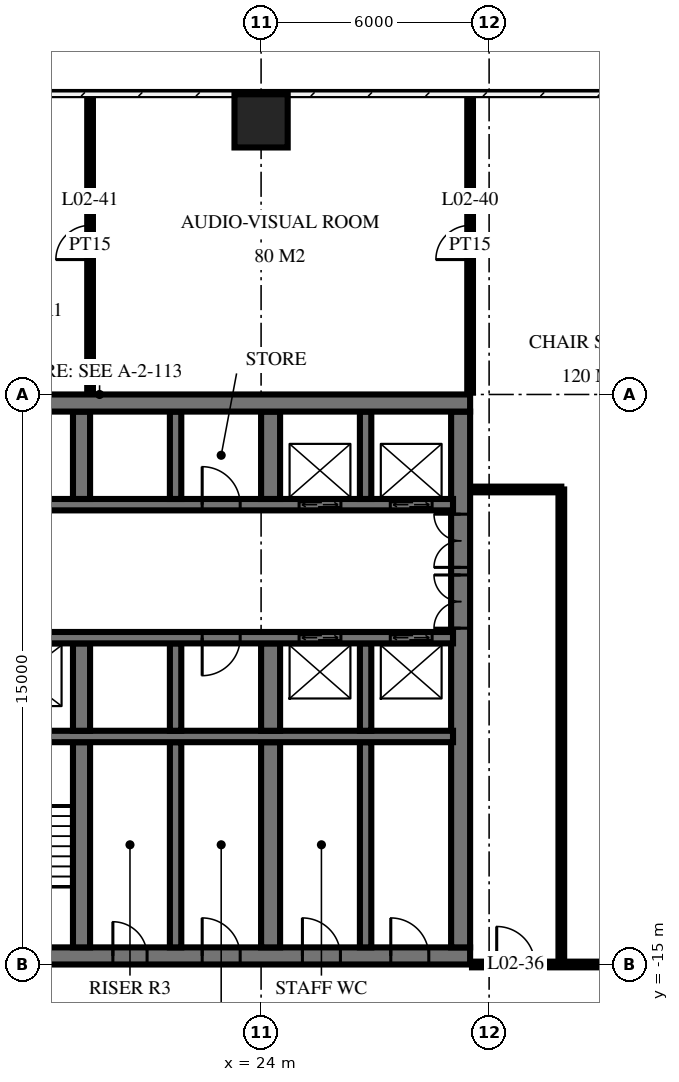
"""IFC4 building model, lengths in metres.
Left out: names, types, materials, properties, quantities, classifications, styles, units other than length and angle.
Written with IfcOpenShell. Run it as: python <this file> out.ifc"""

import sys

from ifc_helpers import new_model, si_unit, direction, frame, frame_2d, origin, origin_2d, place, context, subcontext, project, spatial, rectangle, circle, extrude, element, fill, save


model = new_model("IFC4")
c1 = context("Model", 3, precision=1e-05, world=origin(), true_north=direction((0.0, 1.0)))
c2 = subcontext(c1, "Body", "Model", "MODEL_VIEW")
j1 = project(units=[si_unit("LENGTHUNIT", "METRE"), si_unit("PLANEANGLEUNIT", "RADIAN")], contexts=[c1])
p1 = place(None, origin())
s1 = spatial("IfcSite", under=j1, at=p1, CompositionType="ELEMENT")
p2 = place(p1, origin())
s2 = spatial("IfcBuilding", under=s1, at=p2, CompositionType="ELEMENT")
p3 = place(p2, frame((0.0, 0.0, 12.5)))
s3 = spatial("IfcBuildingStorey", under=s2, at=p3, CompositionType="ELEMENT", Elevation=12.5)
p4 = place(p3, frame((24.0, 7.2, 0.0), z_axis=(0.0, 0.0, 1.0), x_axis=(1.0, 0.0, 0.0)))
e1 = element("IfcColumn", 1, at=p4, inside=s3, PredefinedType="COLUMN", context=c2, shape_type="SweptSolid", body=[
    extrude(circle(Radius=0.7, at=origin_2d()), origin(), (0.0, 0.0, 1.0), 5.5),
])
p5 = place(p3, frame((10.0, -0.225, 0.0), z_axis=(0.0, 0.0, 1.0), x_axis=(1.0, 0.0, 0.0)))
e2 = element("IfcWall", 2, at=p5, inside=s3, PredefinedType="SHEAR", context=c2, shape_type="SweptSolid", body=[
    extrude(rectangle(XDim=19.5, YDim=0.45, at=frame_2d((9.75, 0.0))), origin(), (0.0, 0.0, 1.0), 5.5),
])
p6 = place(p3, frame((10.0, -14.775, 0.0), z_axis=(0.0, 0.0, 1.0), x_axis=(1.0, 0.0, 0.0)))
e3 = element("IfcWall", 3, at=p6, inside=s3, PredefinedType="SHEAR", context=c2, shape_type="SweptSolid", body=[
    extrude(rectangle(XDim=19.5, YDim=0.45, at=frame_2d((9.75, 0.0))), origin(), (0.0, 0.0, 1.0), 5.5),
])
p7 = place(p6, frame((7.1, 0.0, 0.0)))
e4 = element("IfcOpeningElement", 4, at=p7, cuts=e3, PredefinedType="OPENING", context=c2, shape_type="SweptSolid", body=[
    extrude(rectangle(XDim=1.2, YDim=2.1, at=frame_2d((0.6, 1.05))), frame((0.0, 0.235, 0.0), z_axis=(0.0, -1.0, 0.0), x_axis=(1.0, 0.0, 0.0)), (0.0, 0.0, 1.0), 0.47),
])
p8 = place(p6, frame((4.15, 0.0, 0.0)))
e5 = element("IfcOpeningElement", 5, at=p8, cuts=e3, PredefinedType="OPENING", context=c2, shape_type="SweptSolid", body=[
    extrude(rectangle(XDim=1.1, YDim=2.1, at=frame_2d((0.55, 1.05))), frame((0.0, 0.235, 0.0), z_axis=(0.0, -1.0, 0.0), x_axis=(1.0, 0.0, 0.0)), (0.0, 0.0, 1.0), 0.47),
])
p9 = place(p6, frame((10.1, 0.0, 0.0)))
e6 = element("IfcOpeningElement", 6, at=p9, cuts=e3, PredefinedType="OPENING", context=c2, shape_type="SweptSolid", body=[
    extrude(rectangle(XDim=0.9, YDim=2.1, at=frame_2d((0.45, 1.05))), frame((0.0, 0.235, 0.0), z_axis=(0.0, -1.0, 0.0), x_axis=(1.0, 0.0, 0.0)), (0.0, 0.0, 1.0), 0.47),
])
p10 = place(p6, frame((12.45, 0.0, 0.0)))
e7 = element("IfcOpeningElement", 7, at=p10, cuts=e3, PredefinedType="OPENING", context=c2, shape_type="SweptSolid", body=[
    extrude(rectangle(XDim=1.0, YDim=2.1, at=frame_2d((0.5, 1.05))), frame((0.0, 0.235, 0.0), z_axis=(0.0, -1.0, 0.0), x_axis=(1.0, 0.0, 0.0)), (0.0, 0.0, 1.0), 0.47),
])
p11 = place(p6, frame((15.087, 0.0, 0.0)))
e8 = element("IfcOpeningElement", 8, at=p11, cuts=e3, PredefinedType="OPENING", context=c2, shape_type="SweptSolid", body=[
    extrude(rectangle(XDim=1.0, YDim=2.1, at=frame_2d((0.5, 1.05))), frame((0.0, 0.235, 0.0), z_axis=(0.0, -1.0, 0.0), x_axis=(1.0, 0.0, 0.0)), (0.0, 0.0, 1.0), 0.47),
])
p12 = place(p6, frame((17.413, 0.0, 0.0)))
e9 = element("IfcOpeningElement", 9, at=p12, cuts=e3, PredefinedType="OPENING", context=c2, shape_type="SweptSolid", body=[
    extrude(rectangle(XDim=1.0, YDim=2.1, at=frame_2d((0.5, 1.05))), frame((0.0, 0.235, 0.0), z_axis=(0.0, -1.0, 0.0), x_axis=(1.0, 0.0, 0.0)), (0.0, 0.0, 1.0), 0.47),
])
p13 = place(p3, frame((29.25, -14.55, 0.0), z_axis=(0.0, 0.0, 1.0), x_axis=(0.0, 1.0, 0.0)))
e10 = element("IfcWall", 10, at=p13, inside=s3, PredefinedType="SHEAR", context=c2, shape_type="SweptSolid", body=[
    extrude(rectangle(XDim=14.1, YDim=0.5, at=frame_2d((7.05, 0.0))), origin(), (0.0, 0.0, 1.0), 5.5),
])
p14 = place(p13, frame((8.4, 0.0, 0.0)))
e11 = element("IfcOpeningElement", 11, at=p14, cuts=e10, PredefinedType="OPENING", context=c2, shape_type="SweptSolid", body=[
    extrude(rectangle(XDim=1.4, YDim=2.4, at=frame_2d((0.7, 1.2))), frame((0.0, 0.26, 0.0), z_axis=(0.0, -1.0, 0.0), x_axis=(1.0, 0.0, 0.0)), (0.0, 0.0, 1.0), 0.52),
])
p15 = place(p13, frame((10.0, 0.0, 0.0)))
e12 = element("IfcOpeningElement", 12, at=p15, cuts=e10, PredefinedType="OPENING", context=c2, shape_type="SweptSolid", body=[
    extrude(rectangle(XDim=1.4, YDim=2.4, at=frame_2d((0.7, 1.2))), frame((0.0, 0.26, 0.0), z_axis=(0.0, -1.0, 0.0), x_axis=(1.0, 0.0, 0.0)), (0.0, 0.0, 1.0), 0.52),
])
p16 = place(p3, frame((10.35, -2.9, 0.0), z_axis=(0.0, 0.0, 1.0), x_axis=(1.0, 0.0, 0.0)))
e13 = element("IfcWall", 13, at=p16, inside=s3, PredefinedType="SHEAR", context=c2, shape_type="SweptSolid", body=[
    extrude(rectangle(XDim=18.7, YDim=0.3, at=frame_2d((9.35, 0.0))), origin(), (0.0, 0.0, 1.0), 5.5),
])
p17 = place(p16, frame((14.65, 0.0, 0.0)))
e14 = element("IfcOpeningElement", 14, at=p17, cuts=e13, PredefinedType="OPENING", context=c2, shape_type="SweptSolid", body=[
    extrude(rectangle(XDim=1.1, YDim=2.1, at=frame_2d((0.55, 1.05))), frame((0.0, 0.16, 0.0), z_axis=(0.0, -1.0, 0.0), x_axis=(1.0, 0.0, 0.0)), (0.0, 0.0, 1.0), 0.32),
])
p18 = place(p16, frame((17.05, 0.0, 0.0)))
e15 = element("IfcOpeningElement", 15, at=p18, cuts=e13, PredefinedType="OPENING", context=c2, shape_type="SweptSolid", body=[
    extrude(rectangle(XDim=1.1, YDim=2.1, at=frame_2d((0.55, 1.05))), frame((0.0, 0.16, 0.0), z_axis=(0.0, -1.0, 0.0), x_axis=(1.0, 0.0, 0.0)), (0.0, 0.0, 1.0), 0.32),
])
p19 = place(p16, frame((6.9, 0.0, 0.0)))
e16 = element("IfcOpeningElement", 16, at=p19, cuts=e13, PredefinedType="OPENING", context=c2, shape_type="SweptSolid", body=[
    extrude(rectangle(XDim=0.9, YDim=2.1, at=frame_2d((0.45, 1.05))), frame((0.0, 0.16, 0.0), z_axis=(0.0, -1.0, 0.0), x_axis=(1.0, 0.0, 0.0)), (0.0, 0.0, 1.0), 0.32),
])
p20 = place(p16, frame((0.85, 0.0, 0.0)))
e17 = element("IfcOpeningElement", 17, at=p20, cuts=e13, PredefinedType="OPENING", context=c2, shape_type="SweptSolid", body=[
    extrude(rectangle(XDim=1.0, YDim=2.1, at=frame_2d((0.5, 1.05))), frame((0.0, 0.16, 0.0), z_axis=(0.0, -1.0, 0.0), x_axis=(1.0, 0.0, 0.0)), (0.0, 0.0, 1.0), 0.32),
])
p21 = place(p16, frame((3.85, 0.0, 0.0)))
e18 = element("IfcOpeningElement", 18, at=p21, cuts=e13, PredefinedType="OPENING", context=c2, shape_type="SweptSolid", body=[
    extrude(rectangle(XDim=1.0, YDim=2.1, at=frame_2d((0.5, 1.05))), frame((0.0, 0.16, 0.0), z_axis=(0.0, -1.0, 0.0), x_axis=(1.0, 0.0, 0.0)), (0.0, 0.0, 1.0), 0.32),
])
p22 = place(p16, frame((12.1, 0.0, 0.0)))
e19 = element("IfcOpeningElement", 19, at=p22, cuts=e13, PredefinedType="OPENING", context=c2, shape_type="SweptSolid", body=[
    extrude(rectangle(XDim=1.0, YDim=2.1, at=frame_2d((0.5, 1.05))), frame((0.0, 0.16, 0.0), z_axis=(0.0, -1.0, 0.0), x_axis=(1.0, 0.0, 0.0)), (0.0, 0.0, 1.0), 0.32),
])
p23 = place(p3, frame((10.35, -6.4, 0.0), z_axis=(0.0, 0.0, 1.0), x_axis=(1.0, 0.0, 0.0)))
e20 = element("IfcWall", 20, at=p23, inside=s3, PredefinedType="SHEAR", context=c2, shape_type="SweptSolid", body=[
    extrude(rectangle(XDim=18.7, YDim=0.3, at=frame_2d((9.35, 0.0))), origin(), (0.0, 0.0, 1.0), 5.5),
])
p24 = place(p23, frame((14.65, 0.0, 0.0)))
e21 = element("IfcOpeningElement", 21, at=p24, cuts=e20, PredefinedType="OPENING", context=c2, shape_type="SweptSolid", body=[
    extrude(rectangle(XDim=1.1, YDim=2.1, at=frame_2d((0.55, 1.05))), frame((0.0, 0.16, 0.0), z_axis=(0.0, -1.0, 0.0), x_axis=(1.0, 0.0, 0.0)), (0.0, 0.0, 1.0), 0.32),
])
p25 = place(p23, frame((17.05, 0.0, 0.0)))
e22 = element("IfcOpeningElement", 22, at=p25, cuts=e20, PredefinedType="OPENING", context=c2, shape_type="SweptSolid", body=[
    extrude(rectangle(XDim=1.1, YDim=2.1, at=frame_2d((0.55, 1.05))), frame((0.0, 0.16, 0.0), z_axis=(0.0, -1.0, 0.0), x_axis=(1.0, 0.0, 0.0)), (0.0, 0.0, 1.0), 0.32),
])
p26 = place(p23, frame((6.8, 0.0, 0.0)))
e23 = element("IfcOpeningElement", 23, at=p26, cuts=e20, PredefinedType="OPENING", context=c2, shape_type="SweptSolid", body=[
    extrude(rectangle(XDim=1.1, YDim=2.1, at=frame_2d((0.55, 1.05))), frame((0.0, 0.16, 0.0), z_axis=(0.0, -1.0, 0.0), x_axis=(1.0, 0.0, 0.0)), (0.0, 0.0, 1.0), 0.32),
])
p27 = place(p23, frame((12.1, 0.0, 0.0)))
e24 = element("IfcOpeningElement", 24, at=p27, cuts=e20, PredefinedType="OPENING", context=c2, shape_type="SweptSolid", body=[
    extrude(rectangle(XDim=1.0, YDim=2.1, at=frame_2d((0.5, 1.05))), frame((0.0, 0.16, 0.0), z_axis=(0.0, -1.0, 0.0), x_axis=(1.0, 0.0, 0.0)), (0.0, 0.0, 1.0), 0.32),
])
p28 = place(p3, frame((10.35, -9.0, 0.0), z_axis=(0.0, 0.0, 1.0), x_axis=(1.0, 0.0, 0.0)))
e25 = element("IfcWall", 25, at=p28, inside=s3, PredefinedType="SHEAR", context=c2, shape_type="SweptSolid", body=[
    extrude(rectangle(XDim=18.7, YDim=0.3, at=frame_2d((9.35, 0.0))), origin(), (0.0, 0.0, 1.0), 5.5),
])
p29 = place(p28, frame((3.8, 0.0, 0.0)))
e26 = element("IfcOpeningElement", 26, at=p29, cuts=e25, PredefinedType="OPENING", context=c2, shape_type="SweptSolid", body=[
    extrude(rectangle(XDim=1.1, YDim=2.1, at=frame_2d((0.55, 1.05))), frame((0.0, 0.16, 0.0), z_axis=(0.0, -1.0, 0.0), x_axis=(1.0, 0.0, 0.0)), (0.0, 0.0, 1.0), 0.32),
])
for number, where, z_axis, x_axis in (
    (27, (19.275, -2.75, 0.0), (0.0, 0.0, 1.0), (0.0, 1.0, 0.0)),
    (28, (19.275, -8.85, 0.0), (0.0, 0.0, 1.0), (0.0, 1.0, 0.0)),
):
    element("IfcWall", number, at=place(p3, frame(where, z_axis=z_axis, x_axis=x_axis)), inside=s3, PredefinedType="SHEAR", context=c2, shape_type="SweptSolid", body=[
        extrude(rectangle(XDim=2.3, YDim=0.45, at=frame_2d((1.15, 0.0))), origin(), (0.0, 0.0, 1.0), 5.5),
    ])
p30 = place(p3, frame((19.275, -14.55, 0.0), z_axis=(0.0, 0.0, 1.0), x_axis=(0.0, 1.0, 0.0)))
e29 = element("IfcWall", 29, at=p30, inside=s3, PredefinedType="SHEAR", context=c2, shape_type="SweptSolid", body=[
    extrude(rectangle(XDim=5.4, YDim=0.45, at=frame_2d((2.7, 0.0))), origin(), (0.0, 0.0, 1.0), 5.5),
])
for number, where, z_axis, x_axis in (
    (30, (21.75, -2.75, 0.0), (0.0, 0.0, 1.0), (0.0, 1.0, 0.0)),
    (31, (21.75, -8.85, 0.0), (0.0, 0.0, 1.0), (0.0, 1.0, 0.0)),
):
    element("IfcWall", number, at=place(p3, frame(where, z_axis=z_axis, x_axis=x_axis)), inside=s3, PredefinedType="SHEAR", context=c2, shape_type="SweptSolid", body=[
        extrude(rectangle(XDim=2.3, YDim=0.3, at=frame_2d((1.15, 0.0))), origin(), (0.0, 0.0, 1.0), 5.5),
    ])
p31 = place(p3, frame((21.75, -14.55, 0.0), z_axis=(0.0, 0.0, 1.0), x_axis=(0.0, 1.0, 0.0)))
e32 = element("IfcWall", 32, at=p31, inside=s3, PredefinedType="SHEAR", context=c2, shape_type="SweptSolid", body=[
    extrude(rectangle(XDim=5.4, YDim=0.3, at=frame_2d((2.7, 0.0))), origin(), (0.0, 0.0, 1.0), 5.5),
])
for number, where, z_axis, x_axis in (
    (33, (24.25, -2.75, 0.0), (0.0, 0.0, 1.0), (0.0, 1.0, 0.0)),
    (34, (24.25, -8.85, 0.0), (0.0, 0.0, 1.0), (0.0, 1.0, 0.0)),
):
    element("IfcWall", number, at=place(p3, frame(where, z_axis=z_axis, x_axis=x_axis)), inside=s3, PredefinedType="SHEAR", context=c2, shape_type="SweptSolid", body=[
        extrude(rectangle(XDim=2.3, YDim=0.5, at=frame_2d((1.15, 0.0))), origin(), (0.0, 0.0, 1.0), 5.5),
    ])
p32 = place(p3, frame((24.25, -14.55, 0.0), z_axis=(0.0, 0.0, 1.0), x_axis=(0.0, 1.0, 0.0)))
e35 = element("IfcWall", 35, at=p32, inside=s3, PredefinedType="SHEAR", context=c2, shape_type="SweptSolid", body=[
    extrude(rectangle(XDim=5.4, YDim=0.5, at=frame_2d((2.7, 0.0))), origin(), (0.0, 0.0, 1.0), 5.5),
])
for number, where, z_axis, x_axis in (
    (36, (26.75, -2.75, 0.0), (0.0, 0.0, 1.0), (0.0, 1.0, 0.0)),
    (37, (26.75, -8.85, 0.0), (0.0, 0.0, 1.0), (0.0, 1.0, 0.0)),
):
    element("IfcWall", number, at=place(p3, frame(where, z_axis=z_axis, x_axis=x_axis)), inside=s3, PredefinedType="SHEAR", context=c2, shape_type="SweptSolid", body=[
        extrude(rectangle(XDim=2.3, YDim=0.3, at=frame_2d((1.15, 0.0))), origin(), (0.0, 0.0, 1.0), 5.5),
    ])
p33 = place(p3, frame((26.75, -14.55, 0.0), z_axis=(0.0, 0.0, 1.0), x_axis=(0.0, 1.0, 0.0)))
e38 = element("IfcWall", 38, at=p33, inside=s3, PredefinedType="SHEAR", context=c2, shape_type="SweptSolid", body=[
    extrude(rectangle(XDim=5.4, YDim=0.3, at=frame_2d((2.7, 0.0))), origin(), (0.0, 0.0, 1.0), 5.5),
])
p34 = place(p3, frame((31.9, -15.0, 0.0), z_axis=(0.0, 0.0, 1.0), x_axis=(0.0, 1.0, 0.0)))
e39 = element("IfcWall", 39, at=p34, inside=s3, PredefinedType="PARTITIONING", context=c2, shape_type="SweptSolid", body=[
    extrude(rectangle(XDim=12.5, YDim=0.15, at=frame_2d((6.25, 0.0))), origin(), (0.0, 0.0, 1.0), 5.05),
])
p35 = place(p3, frame((29.5, 0.05, 0.0), z_axis=(0.0, 0.0, 1.0), x_axis=(0.0, 1.0, 0.0)))
e40 = element("IfcWall", 40, at=p35, inside=s3, PredefinedType="PARTITIONING", context=c2, shape_type="SweptSolid", body=[
    extrude(rectangle(XDim=7.77, YDim=0.15, at=frame_2d((3.885, 0.0))), origin(), (0.0, 0.0, 1.0), 5.05),
])
p36 = place(p35, frame((3.5, 0.0, 0.0)))
e41 = element("IfcOpeningElement", 41, at=p36, cuts=e40, PredefinedType="OPENING", context=c2, shape_type="SweptSolid", body=[
    extrude(rectangle(XDim=0.9, YDim=2.1, at=frame_2d((0.45, 1.05))), frame((0.0, 0.085, 0.0), z_axis=(0.0, -1.0, 0.0), x_axis=(1.0, 0.0, 0.0)), (0.0, 0.0, 1.0), 0.17),
])
p37 = place(p3, frame((19.5, 0.05, 0.0), z_axis=(0.0, 0.0, 1.0), x_axis=(0.0, 1.0, 0.0)))
e42 = element("IfcWall", 42, at=p37, inside=s3, PredefinedType="PARTITIONING", context=c2, shape_type="SweptSolid", body=[
    extrude(rectangle(XDim=7.77, YDim=0.15, at=frame_2d((3.885, 0.0))), origin(), (0.0, 0.0, 1.0), 5.05),
])
p38 = place(p37, frame((3.5, 0.0, 0.0)))
e43 = element("IfcOpeningElement", 43, at=p38, cuts=e42, PredefinedType="OPENING", context=c2, shape_type="SweptSolid", body=[
    extrude(rectangle(XDim=0.9, YDim=2.1, at=frame_2d((0.45, 1.05))), frame((0.0, 0.085, 0.0), z_axis=(0.0, -1.0, 0.0), x_axis=(1.0, 0.0, 0.0)), (0.0, 0.0, 1.0), 0.17),
])
p39 = place(p3, frame((29.55, -15.0, 0.0), z_axis=(0.0, 0.0, 1.0), x_axis=(1.0, 0.0, 0.0)))
e44 = element("IfcWall", 44, at=p39, inside=s3, PredefinedType="PARTITIONING", context=c2, shape_type="SweptSolid", body=[
    extrude(rectangle(XDim=18.27, YDim=0.15, at=frame_2d((9.135, 0.0))), origin(), (0.0, 0.0, 1.0), 5.05),
])
p40 = place(p39, frame((15.65, 0.0, 0.0)))
e45 = element("IfcOpeningElement", 45, at=p40, cuts=e44, PredefinedType="OPENING", context=c2, shape_type="SweptSolid", body=[
    extrude(rectangle(XDim=1.0, YDim=2.1, at=frame_2d((0.5, 1.05))), frame((0.0, 0.085, 0.0), z_axis=(0.0, -1.0, 0.0), x_axis=(1.0, 0.0, 0.0)), (0.0, 0.0, 1.0), 0.17),
])
p41 = place(p39, frame((13.47, 0.0, 0.0)))
e46 = element("IfcOpeningElement", 46, at=p41, cuts=e44, PredefinedType="OPENING", context=c2, shape_type="SweptSolid", body=[
    extrude(rectangle(XDim=1.0, YDim=2.1, at=frame_2d((0.5, 1.05))), frame((0.0, 0.085, 0.0), z_axis=(0.0, -1.0, 0.0), x_axis=(1.0, 0.0, 0.0)), (0.0, 0.0, 1.0), 0.17),
])
p42 = place(p39, frame((8.97, 0.0, 0.0)))
e47 = element("IfcOpeningElement", 47, at=p42, cuts=e44, PredefinedType="OPENING", context=c2, shape_type="SweptSolid", body=[
    extrude(rectangle(XDim=1.0, YDim=2.1, at=frame_2d((0.5, 1.05))), frame((0.0, 0.085, 0.0), z_axis=(0.0, -1.0, 0.0), x_axis=(1.0, 0.0, 0.0)), (0.0, 0.0, 1.0), 0.17),
])
p43 = place(p39, frame((3.92, 0.0, 0.0)))
e48 = element("IfcOpeningElement", 48, at=p43, cuts=e44, PredefinedType="OPENING", context=c2, shape_type="SweptSolid", body=[
    extrude(rectangle(XDim=1.0, YDim=2.1, at=frame_2d((0.5, 1.05))), frame((0.0, 0.085, 0.0), z_axis=(0.0, -1.0, 0.0), x_axis=(1.0, 0.0, 0.0)), (0.0, 0.0, 1.0), 0.17),
])
p44 = place(p39, frame((0.65, 0.0, 0.0)))
e49 = element("IfcOpeningElement", 49, at=p44, cuts=e44, PredefinedType="OPENING", context=c2, shape_type="SweptSolid", body=[
    extrude(rectangle(XDim=1.0, YDim=2.1, at=frame_2d((0.5, 1.05))), frame((0.0, 0.085, 0.0), z_axis=(0.0, -1.0, 0.0), x_axis=(1.0, 0.0, 0.0)), (0.0, 0.0, 1.0), 0.17),
])
p45 = place(p3, frame((29.55, -2.5, 0.0), z_axis=(0.0, 0.0, 1.0), x_axis=(1.0, 0.0, 0.0)))
e50 = element("IfcWall", 50, at=p45, inside=s3, PredefinedType="PARTITIONING", context=c2, shape_type="SweptSolid", body=[
    extrude(rectangle(XDim=2.35, YDim=0.15, at=frame_2d((1.175, 0.0))), origin(), (0.0, 0.0, 1.0), 5.05),
])
p46 = place(p17, origin())
e51 = element("IfcDoor", 51, at=p46, inside=s3, OperationType="DOUBLE_DOOR_SLIDING", PredefinedType="USERDEFINED", context=c2, shape_type="SweptSolid", body=[
    extrude(rectangle(XDim=1.1, YDim=2.1, at=frame_2d((0.55, 1.05))), frame((0.0, 0.025, 0.0), z_axis=(0.0, -1.0, 0.0), x_axis=(1.0, 0.0, 0.0)), (0.0, 0.0, 1.0), 0.05),
])
fill(e14, e51)
p47 = place(p18, origin())
e52 = element("IfcDoor", 52, at=p47, inside=s3, OperationType="DOUBLE_DOOR_SLIDING", PredefinedType="USERDEFINED", context=c2, shape_type="SweptSolid", body=[
    extrude(rectangle(XDim=1.1, YDim=2.1, at=frame_2d((0.55, 1.05))), frame((0.0, 0.025, 0.0), z_axis=(0.0, -1.0, 0.0), x_axis=(1.0, 0.0, 0.0)), (0.0, 0.0, 1.0), 0.05),
])
fill(e15, e52)
p48 = place(p24, origin())
e53 = element("IfcDoor", 53, at=p48, inside=s3, OperationType="DOUBLE_DOOR_SLIDING", PredefinedType="USERDEFINED", context=c2, shape_type="SweptSolid", body=[
    extrude(rectangle(XDim=1.1, YDim=2.1, at=frame_2d((0.55, 1.05))), frame((0.0, 0.025, 0.0), z_axis=(0.0, -1.0, 0.0), x_axis=(1.0, 0.0, 0.0)), (0.0, 0.0, 1.0), 0.05),
])
fill(e21, e53)
p49 = place(p25, origin())
e54 = element("IfcDoor", 54, at=p49, inside=s3, OperationType="DOUBLE_DOOR_SLIDING", PredefinedType="USERDEFINED", context=c2, shape_type="SweptSolid", body=[
    extrude(rectangle(XDim=1.1, YDim=2.1, at=frame_2d((0.55, 1.05))), frame((0.0, 0.025, 0.0), z_axis=(0.0, -1.0, 0.0), x_axis=(1.0, 0.0, 0.0)), (0.0, 0.0, 1.0), 0.05),
])
fill(e22, e54)
p50 = place(p14, origin())
e55 = element("IfcDoor", 55, at=p50, inside=s3, OperationType="DOUBLE_DOOR_SINGLE_SWING", PredefinedType="DOOR", context=c2, shape_type="SweptSolid", body=[
    extrude(rectangle(XDim=1.4, YDim=2.4, at=frame_2d((0.7, 1.2))), frame((0.0, 0.025, 0.0), z_axis=(0.0, -1.0, 0.0), x_axis=(1.0, 0.0, 0.0)), (0.0, 0.0, 1.0), 0.05),
])
fill(e11, e55)
p51 = place(p15, origin())
e56 = element("IfcDoor", 56, at=p51, inside=s3, OperationType="DOUBLE_DOOR_SINGLE_SWING", PredefinedType="DOOR", context=c2, shape_type="SweptSolid", body=[
    extrude(rectangle(XDim=1.4, YDim=2.4, at=frame_2d((0.7, 1.2))), frame((0.0, 0.025, 0.0), z_axis=(0.0, -1.0, 0.0), x_axis=(1.0, 0.0, 0.0)), (0.0, 0.0, 1.0), 0.05),
])
fill(e12, e56)
p52 = place(p9, origin())
e57 = element("IfcDoor", 57, at=p52, inside=s3, OperationType="SINGLE_SWING_RIGHT", PredefinedType="DOOR", context=c2, shape_type="SweptSolid", body=[
    extrude(rectangle(XDim=0.9, YDim=2.1, at=frame_2d((0.45, 1.05))), frame((0.0, 0.025, 0.0), z_axis=(0.0, -1.0, 0.0), x_axis=(1.0, 0.0, 0.0)), (0.0, 0.0, 1.0), 0.05),
])
fill(e6, e57)
p53 = place(p10, origin())
e58 = element("IfcDoor", 58, at=p53, inside=s3, OperationType="SINGLE_SWING_RIGHT", PredefinedType="DOOR", context=c2, shape_type="SweptSolid", body=[
    extrude(rectangle(XDim=1.0, YDim=2.1, at=frame_2d((0.5, 1.05))), frame((0.0, 0.025, 0.0), z_axis=(0.0, -1.0, 0.0), x_axis=(1.0, 0.0, 0.0)), (0.0, 0.0, 1.0), 0.05),
])
fill(e7, e58)
p54 = place(p11, origin())
e59 = element("IfcDoor", 59, at=p54, inside=s3, OperationType="SINGLE_SWING_RIGHT", PredefinedType="DOOR", context=c2, shape_type="SweptSolid", body=[
    extrude(rectangle(XDim=1.0, YDim=2.1, at=frame_2d((0.5, 1.05))), frame((0.0, 0.025, 0.0), z_axis=(0.0, -1.0, 0.0), x_axis=(1.0, 0.0, 0.0)), (0.0, 0.0, 1.0), 0.05),
])
fill(e8, e59)
p55 = place(p12, origin())
e60 = element("IfcDoor", 60, at=p55, inside=s3, OperationType="SINGLE_SWING_RIGHT", PredefinedType="DOOR", context=c2, shape_type="SweptSolid", body=[
    extrude(rectangle(XDim=1.0, YDim=2.1, at=frame_2d((0.5, 1.05))), frame((0.0, 0.025, 0.0), z_axis=(0.0, -1.0, 0.0), x_axis=(1.0, 0.0, 0.0)), (0.0, 0.0, 1.0), 0.05),
])
fill(e9, e60)
p56 = place(p22, origin())
e61 = element("IfcDoor", 61, at=p56, inside=s3, OperationType="SINGLE_SWING_RIGHT", PredefinedType="DOOR", context=c2, shape_type="SweptSolid", body=[
    extrude(rectangle(XDim=1.0, YDim=2.1, at=frame_2d((0.5, 1.05))), frame((0.0, 0.025, 0.0), z_axis=(0.0, -1.0, 0.0), x_axis=(1.0, 0.0, 0.0)), (0.0, 0.0, 1.0), 0.05),
])
fill(e19, e61)
p57 = place(p27, frame((0.5, 0.0, 0.0), z_axis=(0.0, 0.0, 1.0), x_axis=(-1.0, 0.0, 0.0)))
e62 = element("IfcDoor", 62, at=p57, inside=s3, OperationType="SINGLE_SWING_LEFT", PredefinedType="DOOR", context=c2, shape_type="SweptSolid", body=[
    extrude(rectangle(XDim=1.0, YDim=2.1, at=frame_2d((0.0, 1.05))), frame((0.0, -0.025, 0.0), z_axis=(0.0, 1.0, 0.0), x_axis=(-1.0, 0.0, 0.0)), (0.0, 0.0, 1.0), 0.05),
])
fill(e24, e62)
p58 = place(p44, origin())
e63 = element("IfcDoor", 63, at=p58, inside=s3, OperationType="SINGLE_SWING_RIGHT", PredefinedType="DOOR", context=c2, shape_type="SweptSolid", body=[
    extrude(rectangle(XDim=1.0, YDim=2.1, at=frame_2d((0.5, 1.05))), frame((0.0, 0.025, 0.0), z_axis=(0.0, -1.0, 0.0), x_axis=(1.0, 0.0, 0.0)), (0.0, 0.0, 1.0), 0.05),
])
fill(e49, e63)
p59 = place(p36, origin())
e64 = element("IfcDoor", 64, at=p59, inside=s3, OperationType="SINGLE_SWING_RIGHT", PredefinedType="DOOR", context=c2, shape_type="SweptSolid", body=[
    extrude(rectangle(XDim=0.9, YDim=2.1, at=frame_2d((0.45, 1.05))), frame((0.0, 0.025, 0.0), z_axis=(0.0, -1.0, 0.0), x_axis=(1.0, 0.0, 0.0)), (0.0, 0.0, 1.0), 0.05),
])
fill(e41, e64)
p60 = place(p38, origin())
e65 = element("IfcDoor", 65, at=p60, inside=s3, OperationType="SINGLE_SWING_RIGHT", PredefinedType="DOOR", context=c2, shape_type="SweptSolid", body=[
    extrude(rectangle(XDim=0.9, YDim=2.1, at=frame_2d((0.45, 1.05))), frame((0.0, 0.025, 0.0), z_axis=(0.0, -1.0, 0.0), x_axis=(1.0, 0.0, 0.0)), (0.0, 0.0, 1.0), 0.05),
])
fill(e43, e65)
save(model, sys.argv[1])
